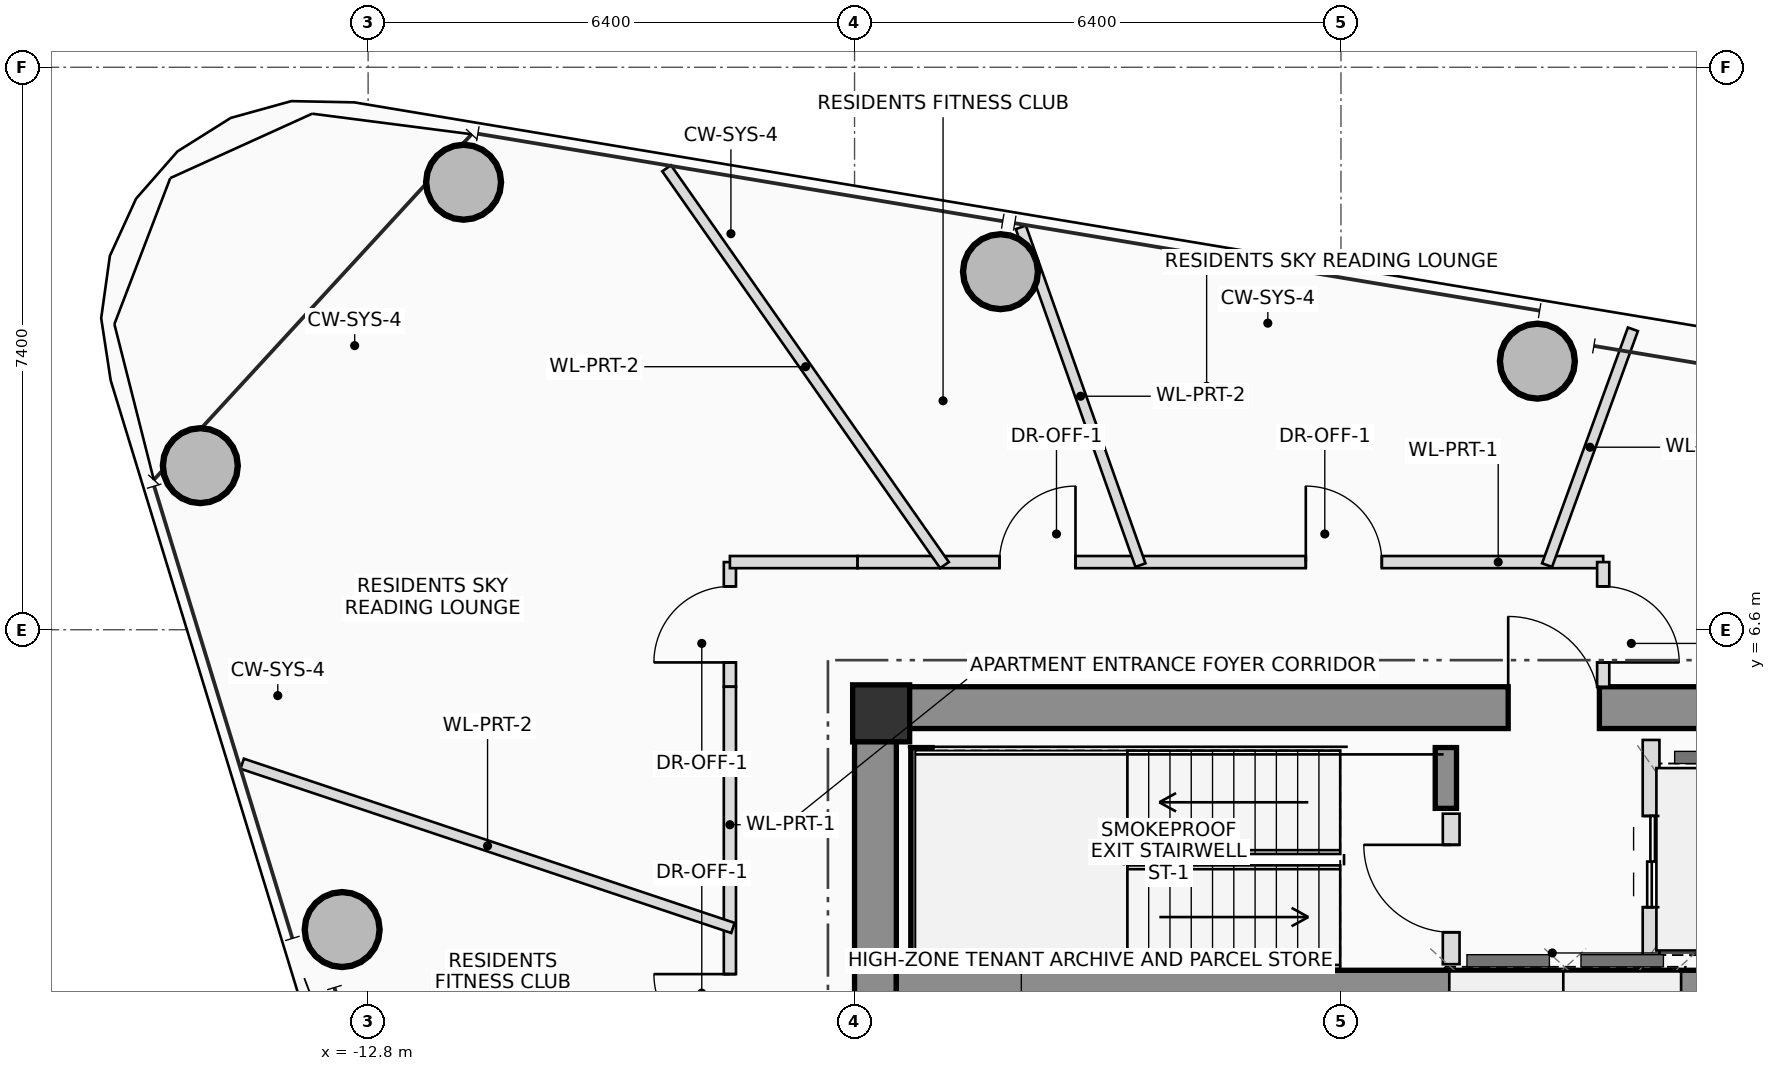
"""IFC4 building model, lengths in metres.
Left out: names, types, materials, properties, quantities, classifications, styles, units other than length and angle.
Written with IfcOpenShell. Run it as: python <this file> out.ifc"""

import sys

from ifc_helpers import new_model, si_unit, direction, frame, frame_2d, origin, origin_2d, place, context, subcontext, project, spatial, rectangle, hollow_circle, extrude, source, transform, mapped, element, fill, save


model = new_model("IFC4")
c1 = context("Model", 3, precision=1e-05, world=origin(), true_north=direction((0.0, 1.0)))
c2 = subcontext(c1, "Body", "Model", "MODEL_VIEW")
j1 = project(units=[si_unit("LENGTHUNIT", "METRE"), si_unit("PLANEANGLEUNIT", "RADIAN")], contexts=[c1])
p1 = place(None, origin())
s1 = spatial("IfcSite", under=j1, at=p1, CompositionType="ELEMENT")
p2 = place(p1, origin())
s2 = spatial("IfcBuilding", under=s1, at=p2, CompositionType="ELEMENT")
p3 = place(p2, frame((0.0, 0.0, 228.65)))
s3 = spatial("IfcBuildingStorey", under=s2, at=p3, CompositionType="ELEMENT", Elevation=228.65)
m1 = source(origin(), c2, "Body", "SweptSolid", [
    extrude(rectangle(XDim=0.75, YDim=0.75, at=origin_2d()), origin(), (0.0, 0.0, 1.0), 3.4),
])
p4 = place(p3, frame((-6.05, 5.5, 0.0), z_axis=(0.0, 0.0, 1.0), x_axis=(1.0, 0.0, 0.0)))
e1 = element("IfcColumn", 1, at=p4, inside=s3, PredefinedType="COLUMN", context=c2, shape_type="MappedRepresentation", body=[
    mapped(m1, transform((0.0, 0.0, 0.0), scale=1.0)),
])
p5 = place(p3, frame((-6.4, 5.575, 0.0), z_axis=(0.0, 0.0, 1.0), x_axis=(1.0, 0.0, 0.0)))
e2 = element("IfcWall", 2, at=p5, inside=s3, PredefinedType="SHEAR", context=c2, shape_type="SweptSolid", body=[
    extrude(rectangle(XDim=12.8, YDim=0.55, at=frame_2d((6.4, 0.0))), origin(), (0.0, 0.0, 1.0), 3.4),
])
p6 = place(p5, frame((8.6, 0.0, 0.0)))
e3 = element("IfcOpeningElement", 3, at=p6, cuts=e2, PredefinedType="OPENING", context=c2, shape_type="SweptSolid", body=[
    extrude(rectangle(XDim=1.2, YDim=2.2, at=frame_2d((0.6, 1.1))), frame((0.0, 0.285, 0.0), z_axis=(0.0, -1.0, 0.0), x_axis=(1.0, 0.0, 0.0)), (0.0, 0.0, 1.0), 0.57),
])
p7 = place(p3, frame((-6.125, 1.75, 0.0), z_axis=(0.0, 0.0, 1.0), x_axis=(0.0, 1.0, 0.0)))
e4 = element("IfcWall", 4, at=p7, inside=s3, PredefinedType="SHEAR", context=c2, shape_type="SweptSolid", body=[
    extrude(rectangle(XDim=3.55, YDim=0.55, at=frame_2d((1.775, 0.0))), origin(), (0.0, 0.0, 1.0), 3.4),
])
p8 = place(p3, frame((-5.85, 1.94, 0.0), z_axis=(0.0, 0.0, 1.0), x_axis=(1.0, 0.0, 0.0)))
e5 = element("IfcWall", 5, at=p8, inside=s3, PredefinedType="SHEAR", context=c2, shape_type="SweptSolid", body=[
    extrude(rectangle(XDim=11.7, YDim=0.36, at=frame_2d((5.85, 0.0))), origin(), (0.0, 0.0, 1.0), 3.4),
])
p9 = place(p3, frame((-5.52, 2.3, 0.0), z_axis=(0.0, 0.0, 1.0), x_axis=(0.0, 1.0, 0.0)))
e6 = element("IfcWall", 6, at=p9, inside=s3, PredefinedType="SHEAR", context=c2, shape_type="SweptSolid", body=[
    extrude(rectangle(XDim=2.75, YDim=0.28, at=frame_2d((1.375, 0.0))), origin(), (0.0, 0.0, 1.0), 3.4),
])
p10 = place(p3, frame((1.38, 4.25, 0.0), z_axis=(0.0, 0.0, 1.0), x_axis=(0.0, 1.0, 0.0)))
e7 = element("IfcWall", 7, at=p10, inside=s3, PredefinedType="SHEAR", context=c2, shape_type="SweptSolid", body=[
    extrude(rectangle(XDim=0.8, YDim=0.28, at=frame_2d((0.4, 0.0))), origin(), (0.0, 0.0, 1.0), 3.4),
])
m2 = source(origin(), c2, "Body", "SweptSolid", [
    extrude(hollow_circle(Radius=0.5, WallThickness=0.04, at=origin_2d()), origin(), (0.0, 0.0, 1.0), 3.4),
])
for number, where, z_axis, x_axis in (
    (8, (2.584, 10.134, 0.0), (0.0, 0.0, 1.0), (1.0, 0.0, 0.0)),
    (9, (-4.48, 11.311, 0.0), (0.0, 0.0, 1.0), (1.0, 0.0, 0.0)),
    (10, (-11.544, 12.488, 0.0), (0.0, 0.0, 1.0), (1.0, 0.0, 0.0)),
    (11, (-15.008, 8.759, 0.0), (0.0, 0.0, 1.0), (1.0, 0.0, 0.0)),
    (12, (-13.142, 2.656, 0.0), (0.0, 0.0, 1.0), (1.0, 0.0, 0.0)),
):
    element("IfcColumn", number, at=place(p3, frame(where, z_axis=z_axis, x_axis=x_axis)), inside=s3, PredefinedType="COLUMN", context=c2, shape_type="MappedRepresentation", body=[
        mapped(m2, transform((0.0, 0.0, 0.0), scale=1.0)),
    ])
p11 = place(p3, frame((1.45, 2.2, 0.0), z_axis=(0.0, 0.0, 1.0), x_axis=(0.0, 1.0, 0.0)))
e13 = element("IfcWall", 13, at=p11, inside=s3, PredefinedType="PLUMBINGWALL", context=c2, shape_type="SweptSolid", body=[
    extrude(rectangle(XDim=1.98, YDim=0.22, at=frame_2d((0.99, 0.0))), origin(), (0.0, 0.0, 1.0), 3.2),
])
p12 = place(p11, frame((0.42, 0.0, 0.0)))
e14 = element("IfcOpeningElement", 14, at=p12, cuts=e13, PredefinedType="OPENING", context=c2, shape_type="SweptSolid", body=[
    extrude(rectangle(XDim=1.15, YDim=2.15, at=frame_2d((0.575, 1.075))), frame((0.0, 0.12, 0.0), z_axis=(0.0, -1.0, 0.0), x_axis=(1.0, 0.0, 0.0)), (0.0, 0.0, 1.0), 0.24),
])
p13 = place(p3, frame((4.08, 2.2, 0.0), z_axis=(0.0, 0.0, 1.0), x_axis=(0.0, 1.0, 0.0)))
e15 = element("IfcWall", 15, at=p13, inside=s3, PredefinedType="PLUMBINGWALL", context=c2, shape_type="SweptSolid", body=[
    extrude(rectangle(XDim=2.95, YDim=0.22, at=frame_2d((1.475, 0.0))), origin(), (0.0, 0.0, 1.0), 3.2),
])
p14 = place(p13, frame((0.75, 0.0, 0.0)))
e16 = element("IfcOpeningElement", 16, at=p14, cuts=e15, PredefinedType="OPENING", context=c2, shape_type="SweptSolid", body=[
    extrude(rectangle(XDim=1.2, YDim=2.25, at=frame_2d((0.6, 1.125))), frame((0.0, 0.12, 0.0), z_axis=(0.0, -1.0, 0.0), x_axis=(1.0, 0.0, 0.0)), (0.0, 0.0, 1.0), 0.24),
])
p15 = place(p3, frame((-8.04, 5.85, 0.0), z_axis=(0.0, 0.0, 1.0), x_axis=(0.0, 1.0, 0.0)))
e17 = element("IfcWall", 17, at=p15, inside=s3, PredefinedType="PARTITIONING", context=c2, shape_type="SweptSolid", body=[
    extrude(rectangle(XDim=1.64, YDim=0.16, at=frame_2d((0.82, 0.0))), origin(), (0.0, 0.0, 1.0), 2.605),
])
p16 = place(p15, frame((0.32, 0.0, 0.0)))
e18 = element("IfcOpeningElement", 18, at=p16, cuts=e17, PredefinedType="OPENING", context=c2, shape_type="SweptSolid", body=[
    extrude(rectangle(XDim=1.0, YDim=2.25, at=frame_2d((0.5, 1.125))), frame((0.0, 0.09, 0.0), z_axis=(0.0, -1.0, 0.0), x_axis=(1.0, 0.0, 0.0)), (0.0, 0.0, 1.0), 0.18),
])
p17 = place(p3, frame((-8.04, 7.49, 0.0), z_axis=(0.0, 0.0, 1.0), x_axis=(1.0, 0.0, 0.0)))
e19 = element("IfcWall", 19, at=p17, inside=s3, PredefinedType="PARTITIONING", context=c2, shape_type="SweptSolid", body=[
    extrude(rectangle(XDim=1.68, YDim=0.16, at=frame_2d((0.84, 0.0))), origin(), (0.0, 0.0, 1.0), 2.605),
])
p18 = place(p3, frame((-6.36, 7.49, 0.0), z_axis=(0.0, 0.0, 1.0), x_axis=(1.0, 0.0, 0.0)))
e20 = element("IfcWall", 20, at=p18, inside=s3, PredefinedType="PARTITIONING", context=c2, shape_type="SweptSolid", body=[
    extrude(rectangle(XDim=9.81, YDim=0.16, at=frame_2d((4.905, 0.0))), origin(), (0.0, 0.0, 1.0), 2.605),
])
p19 = place(p18, frame((1.867, 0.0, 0.0)))
e21 = element("IfcOpeningElement", 21, at=p19, cuts=e20, PredefinedType="OPENING", context=c2, shape_type="SweptSolid", body=[
    extrude(rectangle(XDim=1.0, YDim=2.25, at=frame_2d((0.5, 1.125))), frame((0.0, 0.09, 0.0), z_axis=(0.0, -1.0, 0.0), x_axis=(1.0, 0.0, 0.0)), (0.0, 0.0, 1.0), 0.18),
])
p20 = place(p18, frame((5.897, 0.0, 0.0)))
e22 = element("IfcOpeningElement", 22, at=p20, cuts=e20, PredefinedType="OPENING", context=c2, shape_type="SweptSolid", body=[
    extrude(rectangle(XDim=1.0, YDim=2.25, at=frame_2d((0.5, 1.125))), frame((0.0, 0.09, 0.0), z_axis=(0.0, -1.0, 0.0), x_axis=(1.0, 0.0, 0.0)), (0.0, 0.0, 1.0), 0.18),
])
p21 = place(p3, frame((3.45, 7.49, 0.0), z_axis=(0.0, 0.0, 1.0), x_axis=(0.0, -1.0, 0.0)))
e23 = element("IfcWall", 23, at=p21, inside=s3, PredefinedType="PARTITIONING", context=c2, shape_type="SweptSolid", body=[
    extrude(rectangle(XDim=1.64, YDim=0.16, at=frame_2d((0.82, 0.0))), origin(), (0.0, 0.0, 1.0), 3.2),
])
p22 = place(p21, frame((0.32, 0.0, 0.0)))
e24 = element("IfcOpeningElement", 24, at=p22, cuts=e23, PredefinedType="OPENING", context=c2, shape_type="SweptSolid", body=[
    extrude(rectangle(XDim=1.0, YDim=2.25, at=frame_2d((0.5, 1.125))), frame((0.0, 0.09, 0.0), z_axis=(0.0, -1.0, 0.0), x_axis=(1.0, 0.0, 0.0)), (0.0, 0.0, 1.0), 0.18),
])
p23 = place(p3, frame((-8.04, -5.85, 0.0), z_axis=(0.0, 0.0, 1.0), x_axis=(0.0, 1.0, 0.0)))
e25 = element("IfcWall", 25, at=p23, inside=s3, PredefinedType="PARTITIONING", context=c2, shape_type="SweptSolid", body=[
    extrude(rectangle(XDim=11.7, YDim=0.16, at=frame_2d((5.85, 0.0))), origin(), (0.0, 0.0, 1.0), 2.605),
])
p24 = place(p23, frame((2.977, 0.0, 0.0)))
e26 = element("IfcOpeningElement", 26, at=p24, cuts=e25, PredefinedType="OPENING", context=c2, shape_type="SweptSolid", body=[
    extrude(rectangle(XDim=1.0, YDim=2.25, at=frame_2d((0.5, 1.125))), frame((0.0, 0.09, 0.0), z_axis=(0.0, -1.0, 0.0), x_axis=(1.0, 0.0, 0.0)), (0.0, 0.0, 1.0), 0.18),
])
p25 = place(p23, frame((6.919, 0.0, 0.0)))
e27 = element("IfcOpeningElement", 27, at=p25, cuts=e25, PredefinedType="OPENING", context=c2, shape_type="SweptSolid", body=[
    extrude(rectangle(XDim=1.0, YDim=2.25, at=frame_2d((0.5, 1.125))), frame((0.0, 0.09, 0.0), z_axis=(0.0, -1.0, 0.0), x_axis=(1.0, 0.0, 0.0)), (0.0, 0.0, 1.0), 0.18),
])
p26 = place(p3, frame((2.712, 7.45, 0.0), z_axis=(0.0, 0.0, 1.0), x_axis=(0.341974588874, 0.9397092, 0.0)))
e28 = element("IfcWall", 28, at=p26, inside=s3, PredefinedType="PARTITIONING", context=c2, shape_type="SweptSolid", body=[
    extrude(rectangle(XDim=3.302, YDim=0.14, at=frame_2d((1.651, 0.0))), origin(), (0.0, 0.0, 1.0), 2.605),
])
p27 = place(p3, frame((-2.638, 7.45, 0.0), z_axis=(0.0, 0.0, 1.0), x_axis=(-0.333819345572, 0.942637069355, 0.0)))
e29 = element("IfcWall", 29, at=p27, inside=s3, PredefinedType="PARTITIONING", context=c2, shape_type="SweptSolid", body=[
    extrude(rectangle(XDim=4.715, YDim=0.14, at=frame_2d((2.357, 0.0))), origin(), (0.0, 0.0, 1.0), 2.765),
])
p28 = place(p3, frame((-5.217, 7.45, 0.0), z_axis=(0.0, 0.0, 1.0), x_axis=(-0.573578024676, 0.819150932129, 0.0)))
e30 = element("IfcWall", 30, at=p28, inside=s3, PredefinedType="PARTITIONING", context=c2, shape_type="SweptSolid", body=[
    extrude(rectangle(XDim=6.374, YDim=0.14, at=frame_2d((3.187, 0.0))), origin(), (0.0, 0.0, 1.0), 2.605),
])
p29 = place(p3, frame((-8.0, 2.677, 0.0), z_axis=(0.0, 0.0, 1.0), x_axis=(-0.948324112853, 0.317303288639, 0.0)))
e31 = element("IfcWall", 31, at=p29, inside=s3, PredefinedType="PARTITIONING", context=c2, shape_type="SweptSolid", body=[
    extrude(rectangle(XDim=6.809, YDim=0.14, at=frame_2d((3.404, 0.0))), origin(), (0.0, 0.0, 1.0), 2.605),
])
p30 = place(p6, origin())
e32 = element("IfcDoor", 32, at=p30, inside=s3, OperationType="SINGLE_SWING_LEFT", PredefinedType="DOOR", context=c2, shape_type="SweptSolid", body=[
    extrude(rectangle(XDim=1.2, YDim=2.2, at=frame_2d((0.6, 1.1))), frame((0.0, 0.025, 0.0), z_axis=(0.0, -1.0, 0.0), x_axis=(1.0, 0.0, 0.0)), (0.0, 0.0, 1.0), 0.05),
])
fill(e3, e32)
p31 = place(p12, origin())
e33 = element("IfcDoor", 33, at=p31, inside=s3, OperationType="SINGLE_SWING_RIGHT", PredefinedType="DOOR", context=c2, shape_type="SweptSolid", body=[
    extrude(rectangle(XDim=1.15, YDim=2.15, at=frame_2d((0.575, 1.075))), frame((0.0, 0.025, 0.0), z_axis=(0.0, -1.0, 0.0), x_axis=(1.0, 0.0, 0.0)), (0.0, 0.0, 1.0), 0.05),
])
fill(e14, e33)
p32 = place(p14, origin())
e34 = element("IfcDoor", 34, at=p32, inside=s3, OperationType="DOUBLE_DOOR_SLIDING", PredefinedType="DOOR", context=c2, shape_type="SweptSolid", body=[
    extrude(rectangle(XDim=1.2, YDim=2.25, at=frame_2d((0.6, 1.125))), frame((0.0, 0.025, 0.0), z_axis=(0.0, -1.0, 0.0), x_axis=(1.0, 0.0, 0.0)), (0.0, 0.0, 1.0), 0.05),
])
fill(e16, e34)
p33 = place(p16, origin())
e35 = element("IfcDoor", 35, at=p33, inside=s3, OperationType="SINGLE_SWING_LEFT", PredefinedType="DOOR", context=c2, shape_type="SweptSolid", body=[
    extrude(rectangle(XDim=1.0, YDim=2.25, at=frame_2d((0.5, 1.125))), frame((0.0, 0.025, 0.0), z_axis=(0.0, -1.0, 0.0), x_axis=(1.0, 0.0, 0.0)), (0.0, 0.0, 1.0), 0.05),
])
fill(e18, e35)
p34 = place(p19, origin())
e36 = element("IfcDoor", 36, at=p34, inside=s3, OperationType="SINGLE_SWING_RIGHT", PredefinedType="DOOR", context=c2, shape_type="SweptSolid", body=[
    extrude(rectangle(XDim=1.0, YDim=2.25, at=frame_2d((0.5, 1.125))), frame((0.0, 0.025, 0.0), z_axis=(0.0, -1.0, 0.0), x_axis=(1.0, 0.0, 0.0)), (0.0, 0.0, 1.0), 0.05),
])
fill(e21, e36)
p35 = place(p20, origin())
e37 = element("IfcDoor", 37, at=p35, inside=s3, OperationType="SINGLE_SWING_LEFT", PredefinedType="DOOR", context=c2, shape_type="SweptSolid", body=[
    extrude(rectangle(XDim=1.0, YDim=2.25, at=frame_2d((0.5, 1.125))), frame((0.0, 0.025, 0.0), z_axis=(0.0, -1.0, 0.0), x_axis=(1.0, 0.0, 0.0)), (0.0, 0.0, 1.0), 0.05),
])
fill(e22, e37)
p36 = place(p22, origin())
e38 = element("IfcDoor", 38, at=p36, inside=s3, OperationType="SINGLE_SWING_RIGHT", PredefinedType="DOOR", context=c2, shape_type="SweptSolid", body=[
    extrude(rectangle(XDim=1.0, YDim=2.25, at=frame_2d((0.5, 1.125))), frame((0.0, 0.025, 0.0), z_axis=(0.0, -1.0, 0.0), x_axis=(1.0, 0.0, 0.0)), (0.0, 0.0, 1.0), 0.05),
])
fill(e24, e38)
p37 = place(p25, origin())
e39 = element("IfcDoor", 39, at=p37, inside=s3, OperationType="SINGLE_SWING_RIGHT", PredefinedType="DOOR", context=c2, shape_type="SweptSolid", body=[
    extrude(rectangle(XDim=1.0, YDim=2.25, at=frame_2d((0.5, 1.125))), frame((0.0, 0.025, 0.0), z_axis=(0.0, -1.0, 0.0), x_axis=(1.0, 0.0, 0.0)), (0.0, 0.0, 1.0), 0.05),
])
fill(e27, e39)
save(model, sys.argv[1])
